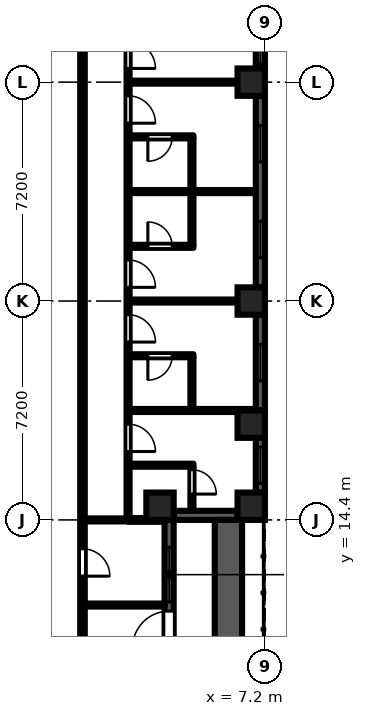
"""IFC4 building model, lengths in metres.
Left out: names, types, materials, properties, quantities, classifications, styles, units other than length and angle.
Written with IfcOpenShell. Run it as: python <this file> out.ifc"""

import sys

from ifc_helpers import new_model, si_unit, direction, frame, frame_2d, origin, origin_2d, place, context, subcontext, project, spatial, rectangle, extrude, element, fill, save


model = new_model("IFC4")
c1 = context("Model", 3, precision=1e-05, world=origin(), true_north=direction((0.0, 1.0)))
c2 = subcontext(c1, "Body", "Model", "MODEL_VIEW")
j1 = project(units=[si_unit("LENGTHUNIT", "METRE"), si_unit("PLANEANGLEUNIT", "RADIAN")], contexts=[c1])
p1 = place(None, origin())
s1 = spatial("IfcSite", under=j1, at=p1, CompositionType="ELEMENT")
p2 = place(p1, origin())
s2 = spatial("IfcBuilding", under=s1, at=p2, CompositionType="ELEMENT")
p3 = place(p2, frame((0.0, 0.0, 11.7)))
s3 = spatial("IfcBuildingStorey", under=s2, at=p3, CompositionType="ELEMENT", Elevation=11.7)
for number, where, z_axis, x_axis in (
    (1, (3.75, 14.85, 0.0), (0.0, 0.0, 1.0), (1.0, 0.0, 0.0)),
    (2, (6.75, 14.85, 0.0), (0.0, 0.0, 1.0), (1.0, 0.0, 0.0)),
    (3, (6.75, 17.55, 0.0), (0.0, 0.0, 1.0), (1.0, 0.0, 0.0)),
    (4, (6.75, 21.6, 0.0), (0.0, 0.0, 1.0), (1.0, 0.0, 0.0)),
    (5, (6.75, 28.8, 0.0), (0.0, 0.0, 1.0), (1.0, 0.0, 0.0)),
):
    element("IfcColumn", number, at=place(p3, frame(where, z_axis=z_axis, x_axis=x_axis)), inside=s3, PredefinedType="COLUMN", context=c2, shape_type="SweptSolid", body=[
        extrude(rectangle(XDim=0.9, YDim=0.9, at=origin_2d()), origin(), (0.0, 0.0, 1.0), 3.0),
    ])
p4 = place(p3, frame((4.05, 7.2, 0.0), z_axis=(0.0, 0.0, 1.0), x_axis=(0.0, 1.0, 0.0)))
e6 = element("IfcWall", 6, at=p4, inside=s3, PredefinedType="SOLIDWALL", context=c2, shape_type="SweptSolid", body=[
    extrude(rectangle(XDim=7.2, YDim=0.3, at=frame_2d((3.6, 0.0))), origin(), (0.0, 0.0, 1.0), 2.1),
])
p5 = place(p4, frame((3.0, 0.0, 0.0)))
e7 = element("IfcOpeningElement", 7, at=p5, cuts=e6, PredefinedType="OPENING", context=c2, shape_type="SweptSolid", body=[
    extrude(rectangle(XDim=1.2, YDim=2.05, at=frame_2d((0.6, 1.025))), frame((0.0, 0.16, 0.0), z_axis=(0.0, -1.0, 0.0), x_axis=(1.0, 0.0, 0.0)), (0.0, 0.0, 1.0), 0.32),
])
p6 = place(p4, frame((0.9, 0.0, 0.2)))
e8 = element("IfcOpeningElement", 8, at=p6, cuts=e6, PredefinedType="OPENING", context=c2, shape_type="SweptSolid", body=[
    extrude(rectangle(XDim=1.8, YDim=1.85, at=frame_2d((0.9, 0.925))), frame((0.0, 0.16, 0.0), z_axis=(0.0, -1.0, 0.0), x_axis=(1.0, 0.0, 0.0)), (0.0, 0.0, 1.0), 0.32),
])
p7 = place(p4, frame((4.5, 0.0, 0.2)))
e9 = element("IfcOpeningElement", 9, at=p7, cuts=e6, PredefinedType="OPENING", context=c2, shape_type="SweptSolid", body=[
    extrude(rectangle(XDim=1.8, YDim=1.85, at=frame_2d((0.9, 0.925))), frame((0.0, 0.16, 0.0), z_axis=(0.0, -1.0, 0.0), x_axis=(1.0, 0.0, 0.0)), (0.0, 0.0, 1.0), 0.32),
])
p8 = place(p3, frame((4.2, 14.55, 0.0), z_axis=(0.0, 0.0, 1.0), x_axis=(1.0, 0.0, 0.0)))
e10 = element("IfcWall", 10, at=p8, inside=s3, PredefinedType="SOLIDWALL", context=c2, shape_type="SweptSolid", body=[
    extrude(rectangle(XDim=2.1, YDim=0.3, at=frame_2d((1.05, 0.0))), origin(), (0.0, 0.0, 1.0), 2.1),
])
p9 = place(p3, frame((7.05, 15.3, 0.0), z_axis=(0.0, 0.0, 1.0), x_axis=(0.0, 1.0, 0.0)))
e11 = element("IfcWall", 11, at=p9, inside=s3, PredefinedType="SOLIDWALL", context=c2, shape_type="SweptSolid", body=[
    extrude(rectangle(XDim=1.8, YDim=0.3, at=frame_2d((0.9, 0.0))), origin(), (0.0, 0.0, 1.0), 2.1),
])
p10 = place(p9, frame((0.3, 0.0, 0.2)))
e12 = element("IfcOpeningElement", 12, at=p10, cuts=e11, PredefinedType="OPENING", context=c2, shape_type="SweptSolid", body=[
    extrude(rectangle(XDim=1.2, YDim=1.85, at=frame_2d((0.6, 0.925))), frame((0.0, 0.16, 0.0), z_axis=(0.0, -1.0, 0.0), x_axis=(1.0, 0.0, 0.0)), (0.0, 0.0, 1.0), 0.32),
])
p11 = place(p3, frame((7.05, 18.0, 0.0), z_axis=(0.0, 0.0, 1.0), x_axis=(0.0, 1.0, 0.0)))
e13 = element("IfcWall", 13, at=p11, inside=s3, PredefinedType="SOLIDWALL", context=c2, shape_type="SweptSolid", body=[
    extrude(rectangle(XDim=3.15, YDim=0.3, at=frame_2d((1.575, 0.0))), origin(), (0.0, 0.0, 1.0), 2.1),
])
p12 = place(p11, frame((0.975, 0.0, 0.2)))
e14 = element("IfcOpeningElement", 14, at=p12, cuts=e13, PredefinedType="OPENING", context=c2, shape_type="SweptSolid", body=[
    extrude(rectangle(XDim=1.2, YDim=1.85, at=frame_2d((0.6, 0.925))), frame((0.0, 0.16, 0.0), z_axis=(0.0, -1.0, 0.0), x_axis=(1.0, 0.0, 0.0)), (0.0, 0.0, 1.0), 0.32),
])
p13 = place(p3, frame((7.05, 22.05, 0.0), z_axis=(0.0, 0.0, 1.0), x_axis=(0.0, 1.0, 0.0)))
e15 = element("IfcWall", 15, at=p13, inside=s3, PredefinedType="SOLIDWALL", context=c2, shape_type="SweptSolid", body=[
    extrude(rectangle(XDim=6.3, YDim=0.3, at=frame_2d((3.15, 0.0))), origin(), (0.0, 0.0, 1.0), 2.1),
])
p14 = place(p13, frame((0.975, 0.0, 0.2)))
e16 = element("IfcOpeningElement", 16, at=p14, cuts=e15, PredefinedType="OPENING", context=c2, shape_type="SweptSolid", body=[
    extrude(rectangle(XDim=1.2, YDim=1.85, at=frame_2d((0.6, 0.925))), frame((0.0, 0.16, 0.0), z_axis=(0.0, -1.0, 0.0), x_axis=(1.0, 0.0, 0.0)), (0.0, 0.0, 1.0), 0.32),
])
p15 = place(p13, frame((4.125, 0.0, 0.2)))
e17 = element("IfcOpeningElement", 17, at=p15, cuts=e15, PredefinedType="OPENING", context=c2, shape_type="SweptSolid", body=[
    extrude(rectangle(XDim=1.2, YDim=1.85, at=frame_2d((0.6, 0.925))), frame((0.0, 0.16, 0.0), z_axis=(0.0, -1.0, 0.0), x_axis=(1.0, 0.0, 0.0)), (0.0, 0.0, 1.0), 0.32),
])
p16 = place(p3, frame((7.05, 29.25, 0.0), z_axis=(0.0, 0.0, 1.0), x_axis=(0.0, 1.0, 0.0)))
e18 = element("IfcWall", 18, at=p16, inside=s3, PredefinedType="SOLIDWALL", context=c2, shape_type="SweptSolid", body=[
    extrude(rectangle(XDim=6.3, YDim=0.3, at=frame_2d((3.15, 0.0))), origin(), (0.0, 0.0, 1.0), 2.1),
])
p17 = place(p16, frame((0.15, 0.0, 0.2)))
e19 = element("IfcOpeningElement", 19, at=p17, cuts=e18, PredefinedType="OPENING", context=c2, shape_type="SweptSolid", body=[
    extrude(rectangle(XDim=2.4, YDim=1.85, at=frame_2d((1.2, 0.925))), frame((0.0, 0.16, 0.0), z_axis=(0.0, -1.0, 0.0), x_axis=(1.0, 0.0, 0.0)), (0.0, 0.0, 1.0), 0.32),
])
p18 = place(p3, frame((6.0, 7.2, 0.0), z_axis=(0.0, 0.0, 1.0), x_axis=(0.0, 1.0, 0.0)))
e20 = element("IfcWall", 20, at=p18, inside=s3, PredefinedType="PARAPET", context=c2, shape_type="SweptSolid", body=[
    extrude(rectangle(XDim=7.2, YDim=0.9, at=frame_2d((3.6, 0.0))), origin(), (0.0, 0.0, 1.0), 0.8),
])
p19 = place(p3, frame((1.2, 1.125, 0.0), z_axis=(0.0, 0.0, 1.0), x_axis=(0.0, 1.0, 0.0)))
e21 = element("IfcWall", 21, at=p19, inside=s3, PredefinedType="PARTITIONING", context=c2, shape_type="SweptSolid", body=[
    extrude(rectangle(XDim=35.375, YDim=0.15, at=frame_2d((17.688, 0.0))), origin(), (0.0, 0.0, 1.0), 2.575),
])
p20 = place(p19, frame((2.625, 0.0, 0.0)))
e22 = element("IfcOpeningElement", 22, at=p20, cuts=e21, PredefinedType="OPENING", context=c2, shape_type="SweptSolid", body=[
    extrude(rectangle(XDim=0.9, YDim=2.1, at=frame_2d((0.45, 1.05))), frame((0.0, 0.085, 0.0), z_axis=(0.0, -1.0, 0.0), x_axis=(1.0, 0.0, 0.0)), (0.0, 0.0, 1.0), 0.17),
])
p21 = place(p19, frame((11.425, 0.0, 0.0)))
e23 = element("IfcOpeningElement", 23, at=p21, cuts=e21, PredefinedType="OPENING", context=c2, shape_type="SweptSolid", body=[
    extrude(rectangle(XDim=0.9, YDim=2.1, at=frame_2d((0.45, 1.05))), frame((0.0, 0.085, 0.0), z_axis=(0.0, -1.0, 0.0), x_axis=(1.0, 0.0, 0.0)), (0.0, 0.0, 1.0), 0.17),
])
p22 = place(p19, frame((7.825, 0.0, 0.0)))
e24 = element("IfcOpeningElement", 24, at=p22, cuts=e21, PredefinedType="OPENING", context=c2, shape_type="SweptSolid", body=[
    extrude(rectangle(XDim=0.9, YDim=2.1, at=frame_2d((0.45, 1.05))), frame((0.0, 0.085, 0.0), z_axis=(0.0, -1.0, 0.0), x_axis=(1.0, 0.0, 0.0)), (0.0, 0.0, 1.0), 0.17),
])
p23 = place(p19, frame((32.825, 0.0, 0.0)))
e25 = element("IfcOpeningElement", 25, at=p23, cuts=e21, PredefinedType="OPENING", context=c2, shape_type="SweptSolid", body=[
    extrude(rectangle(XDim=1.0, YDim=2.1, at=frame_2d((0.5, 1.05))), frame((0.0, 0.085, 0.0), z_axis=(0.0, -1.0, 0.0), x_axis=(1.0, 0.0, 0.0)), (0.0, 0.0, 1.0), 0.17),
])
p24 = place(p3, frame((1.275, 11.6, 0.0), z_axis=(0.0, 0.0, 1.0), x_axis=(1.0, 0.0, 0.0)))
e26 = element("IfcWall", 26, at=p24, inside=s3, PredefinedType="PARTITIONING", context=c2, shape_type="SweptSolid", body=[
    extrude(rectangle(XDim=2.625, YDim=0.1, at=frame_2d((1.312, 0.0))), origin(), (0.0, 0.0, 1.0), 2.575),
])
p25 = place(p3, frame((1.275, 14.4, 0.0), z_axis=(0.0, 0.0, 1.0), x_axis=(1.0, 0.0, 0.0)))
e27 = element("IfcWall", 27, at=p25, inside=s3, PredefinedType="PARTITIONING", context=c2, shape_type="SweptSolid", body=[
    extrude(rectangle(XDim=1.425, YDim=0.1, at=frame_2d((0.712, 0.0))), origin(), (0.0, 0.0, 1.0), 2.575),
])
p26 = place(p3, frame((2.7, 14.462, 0.0), z_axis=(0.0, 0.0, 1.0), x_axis=(0.0, 1.0, 0.0)))
e28 = element("IfcWall", 28, at=p26, inside=s3, PredefinedType="PARTITIONING", context=c2, shape_type="SweptSolid", body=[
    extrude(rectangle(XDim=17.888, YDim=0.1, at=frame_2d((8.944, 0.0))), origin(), (0.0, 0.0, 1.0), 2.575),
])
p27 = place(p26, frame((2.188, 0.0, 0.0)))
e29 = element("IfcOpeningElement", 29, at=p27, cuts=e28, PredefinedType="OPENING", context=c2, shape_type="SweptSolid", body=[
    extrude(rectangle(XDim=0.9, YDim=2.1, at=frame_2d((0.45, 1.05))), frame((0.0, 0.06, 0.0), z_axis=(0.0, -1.0, 0.0), x_axis=(1.0, 0.0, 0.0)), (0.0, 0.0, 1.0), 0.12),
])
p28 = place(p26, frame((5.788, 0.0, 0.0)))
e30 = element("IfcOpeningElement", 30, at=p28, cuts=e28, PredefinedType="OPENING", context=c2, shape_type="SweptSolid", body=[
    extrude(rectangle(XDim=0.9, YDim=2.1, at=frame_2d((0.45, 1.05))), frame((0.0, 0.06, 0.0), z_axis=(0.0, -1.0, 0.0), x_axis=(1.0, 0.0, 0.0)), (0.0, 0.0, 1.0), 0.12),
])
p29 = place(p26, frame((7.587, 0.0, 0.0)))
e31 = element("IfcOpeningElement", 31, at=p29, cuts=e28, PredefinedType="OPENING", context=c2, shape_type="SweptSolid", body=[
    extrude(rectangle(XDim=0.9, YDim=2.1, at=frame_2d((0.45, 1.05))), frame((0.0, 0.06, 0.0), z_axis=(0.0, -1.0, 0.0), x_axis=(1.0, 0.0, 0.0)), (0.0, 0.0, 1.0), 0.12),
])
p30 = place(p26, frame((12.988, 0.0, 0.0)))
e32 = element("IfcOpeningElement", 32, at=p30, cuts=e28, PredefinedType="OPENING", context=c2, shape_type="SweptSolid", body=[
    extrude(rectangle(XDim=0.9, YDim=2.1, at=frame_2d((0.45, 1.05))), frame((0.0, 0.06, 0.0), z_axis=(0.0, -1.0, 0.0), x_axis=(1.0, 0.0, 0.0)), (0.0, 0.0, 1.0), 0.12),
])
p31 = place(p26, frame((14.788, 0.0, 0.0)))
e33 = element("IfcOpeningElement", 33, at=p31, cuts=e28, PredefinedType="OPENING", context=c2, shape_type="SweptSolid", body=[
    extrude(rectangle(XDim=0.9, YDim=2.1, at=frame_2d((0.45, 1.05))), frame((0.0, 0.06, 0.0), z_axis=(0.0, -1.0, 0.0), x_axis=(1.0, 0.0, 0.0)), (0.0, 0.0, 1.0), 0.12),
])
p32 = place(p3, frame((2.7, 14.4, 0.0), z_axis=(0.0, 0.0, 1.0), x_axis=(1.0, 0.0, 0.0)))
e34 = element("IfcWall", 34, at=p32, inside=s3, PredefinedType="PARTITIONING", context=c2, shape_type="SweptSolid", body=[
    extrude(rectangle(XDim=1.2, YDim=0.125, at=frame_2d((0.6, 0.0))), origin(), (0.0, 0.0, 1.0), 2.575),
])
p33 = place(p3, frame((2.75, 16.2, 0.0), z_axis=(0.0, 0.0, 1.0), x_axis=(1.0, 0.0, 0.0)))
e35 = element("IfcWall", 35, at=p33, inside=s3, PredefinedType="PARTITIONING", context=c2, shape_type="SweptSolid", body=[
    extrude(rectangle(XDim=2.1, YDim=0.1, at=frame_2d((1.05, 0.0))), origin(), (0.0, 0.0, 1.0), 2.575),
])
p34 = place(p3, frame((2.75, 18.0, 0.0), z_axis=(0.0, 0.0, 1.0), x_axis=(1.0, 0.0, 0.0)))
e36 = element("IfcWall", 36, at=p34, inside=s3, PredefinedType="PARTITIONING", context=c2, shape_type="SweptSolid", body=[
    extrude(rectangle(XDim=4.15, YDim=0.1, at=frame_2d((2.075, 0.0))), origin(), (0.0, 0.0, 1.0), 2.575),
])
p35 = place(p3, frame((2.75, 19.8, 0.0), z_axis=(0.0, 0.0, 1.0), x_axis=(1.0, 0.0, 0.0)))
e37 = element("IfcWall", 37, at=p35, inside=s3, PredefinedType="PARTITIONING", context=c2, shape_type="SweptSolid", body=[
    extrude(rectangle(XDim=2.1, YDim=0.1, at=frame_2d((1.05, 0.0))), origin(), (0.0, 0.0, 1.0), 2.575),
])
p36 = place(p35, frame((0.6, 0.0, 0.0)))
e38 = element("IfcOpeningElement", 38, at=p36, cuts=e37, PredefinedType="OPENING", context=c2, shape_type="SweptSolid", body=[
    extrude(rectangle(XDim=0.8, YDim=2.1, at=frame_2d((0.4, 1.05))), frame((0.0, 0.06, 0.0), z_axis=(0.0, -1.0, 0.0), x_axis=(1.0, 0.0, 0.0)), (0.0, 0.0, 1.0), 0.12),
])
p37 = place(p3, frame((2.75, 21.6, 0.0), z_axis=(0.0, 0.0, 1.0), x_axis=(1.0, 0.0, 0.0)))
e39 = element("IfcWall", 39, at=p37, inside=s3, PredefinedType="PARTITIONING", context=c2, shape_type="SweptSolid", body=[
    extrude(rectangle(XDim=4.15, YDim=0.1, at=frame_2d((2.075, 0.0))), origin(), (0.0, 0.0, 1.0), 2.575),
])
p38 = place(p3, frame((2.75, 23.4, 0.0), z_axis=(0.0, 0.0, 1.0), x_axis=(1.0, 0.0, 0.0)))
e40 = element("IfcWall", 40, at=p38, inside=s3, PredefinedType="PARTITIONING", context=c2, shape_type="SweptSolid", body=[
    extrude(rectangle(XDim=2.1, YDim=0.1, at=frame_2d((1.05, 0.0))), origin(), (0.0, 0.0, 1.0), 2.575),
])
p39 = place(p38, frame((0.6, 0.0, 0.0)))
e41 = element("IfcOpeningElement", 41, at=p39, cuts=e40, PredefinedType="OPENING", context=c2, shape_type="SweptSolid", body=[
    extrude(rectangle(XDim=0.8, YDim=2.1, at=frame_2d((0.4, 1.05))), frame((0.0, 0.06, 0.0), z_axis=(0.0, -1.0, 0.0), x_axis=(1.0, 0.0, 0.0)), (0.0, 0.0, 1.0), 0.12),
])
p40 = place(p3, frame((2.75, 25.2, 0.0), z_axis=(0.0, 0.0, 1.0), x_axis=(1.0, 0.0, 0.0)))
e42 = element("IfcWall", 42, at=p40, inside=s3, PredefinedType="PARTITIONING", context=c2, shape_type="SweptSolid", body=[
    extrude(rectangle(XDim=4.15, YDim=0.1, at=frame_2d((2.075, 0.0))), origin(), (0.0, 0.0, 1.0), 2.575),
])
p41 = place(p3, frame((2.75, 27.0, 0.0), z_axis=(0.0, 0.0, 1.0), x_axis=(1.0, 0.0, 0.0)))
e43 = element("IfcWall", 43, at=p41, inside=s3, PredefinedType="PARTITIONING", context=c2, shape_type="SweptSolid", body=[
    extrude(rectangle(XDim=2.1, YDim=0.1, at=frame_2d((1.05, 0.0))), origin(), (0.0, 0.0, 1.0), 2.575),
])
p42 = place(p41, frame((0.6, 0.0, 0.0)))
e44 = element("IfcOpeningElement", 44, at=p42, cuts=e43, PredefinedType="OPENING", context=c2, shape_type="SweptSolid", body=[
    extrude(rectangle(XDim=0.8, YDim=2.1, at=frame_2d((0.4, 1.05))), frame((0.0, 0.06, 0.0), z_axis=(0.0, -1.0, 0.0), x_axis=(1.0, 0.0, 0.0)), (0.0, 0.0, 1.0), 0.12),
])
p43 = place(p3, frame((2.75, 28.8, 0.0), z_axis=(0.0, 0.0, 1.0), x_axis=(1.0, 0.0, 0.0)))
e45 = element("IfcWall", 45, at=p43, inside=s3, PredefinedType="PARTITIONING", context=c2, shape_type="SweptSolid", body=[
    extrude(rectangle(XDim=4.15, YDim=0.1, at=frame_2d((2.075, 0.0))), origin(), (0.0, 0.0, 1.0), 2.575),
])
p44 = place(p3, frame((4.8, 14.7, 0.0), z_axis=(0.0, 0.0, 1.0), x_axis=(0.0, 1.0, 0.0)))
e46 = element("IfcWall", 46, at=p44, inside=s3, PredefinedType="PARTITIONING", context=c2, shape_type="SweptSolid", body=[
    extrude(rectangle(XDim=1.45, YDim=0.1, at=frame_2d((0.725, 0.0))), origin(), (0.0, 0.0, 1.0), 2.575),
])
p45 = place(p44, frame((0.55, 0.0, 0.0)))
e47 = element("IfcOpeningElement", 47, at=p45, cuts=e46, PredefinedType="OPENING", context=c2, shape_type="SweptSolid", body=[
    extrude(rectangle(XDim=0.8, YDim=2.1, at=frame_2d((0.4, 1.05))), frame((0.0, 0.06, 0.0), z_axis=(0.0, -1.0, 0.0), x_axis=(1.0, 0.0, 0.0)), (0.0, 0.0, 1.0), 0.12),
])
p46 = place(p3, frame((4.8, 18.05, 0.0), z_axis=(0.0, 0.0, 1.0), x_axis=(0.0, 1.0, 0.0)))
e48 = element("IfcWall", 48, at=p46, inside=s3, PredefinedType="PARTITIONING", context=c2, shape_type="SweptSolid", body=[
    extrude(rectangle(XDim=1.7, YDim=0.1, at=frame_2d((0.85, 0.0))), origin(), (0.0, 0.0, 1.0), 2.575),
])
p47 = place(p3, frame((4.8, 23.45, 0.0), z_axis=(0.0, 0.0, 1.0), x_axis=(0.0, 1.0, 0.0)))
e49 = element("IfcWall", 49, at=p47, inside=s3, PredefinedType="PARTITIONING", context=c2, shape_type="SweptSolid", body=[
    extrude(rectangle(XDim=3.5, YDim=0.1, at=frame_2d((1.75, 0.0))), origin(), (0.0, 0.0, 1.0), 2.575),
])
p48 = place(p5, origin())
e50 = element("IfcDoor", 50, at=p48, inside=s3, OperationType="SINGLE_SWING_LEFT", PredefinedType="DOOR", context=c2, shape_type="SweptSolid", body=[
    extrude(rectangle(XDim=1.2, YDim=2.05, at=frame_2d((0.6, 1.025))), frame((0.0, 0.025, 0.0), z_axis=(0.0, -1.0, 0.0), x_axis=(1.0, 0.0, 0.0)), (0.0, 0.0, 1.0), 0.05),
])
fill(e7, e50)
p49 = place(p7, origin())
e51 = element("IfcWindow", 51, at=p49, inside=s3, PartitioningType="SINGLE_PANEL", PredefinedType="WINDOW", context=c2, shape_type="SweptSolid", body=[
    extrude(rectangle(XDim=1.8, YDim=1.85, at=frame_2d((0.9, 0.925))), frame((0.0, 0.03, 0.0), z_axis=(0.0, -1.0, 0.0), x_axis=(1.0, 0.0, 0.0)), (0.0, 0.0, 1.0), 0.06),
])
fill(e9, e51)
p50 = place(p10, origin())
e52 = element("IfcWindow", 52, at=p50, inside=s3, PartitioningType="SINGLE_PANEL", PredefinedType="WINDOW", context=c2, shape_type="SweptSolid", body=[
    extrude(rectangle(XDim=1.2, YDim=1.85, at=frame_2d((0.6, 0.925))), frame((0.0, 0.03, 0.0), z_axis=(0.0, -1.0, 0.0), x_axis=(1.0, 0.0, 0.0)), (0.0, 0.0, 1.0), 0.06),
])
fill(e12, e52)
p51 = place(p12, origin())
e53 = element("IfcWindow", 53, at=p51, inside=s3, PartitioningType="SINGLE_PANEL", PredefinedType="WINDOW", context=c2, shape_type="SweptSolid", body=[
    extrude(rectangle(XDim=1.2, YDim=1.85, at=frame_2d((0.6, 0.925))), frame((0.0, 0.03, 0.0), z_axis=(0.0, -1.0, 0.0), x_axis=(1.0, 0.0, 0.0)), (0.0, 0.0, 1.0), 0.06),
])
fill(e14, e53)
p52 = place(p14, origin())
e54 = element("IfcWindow", 54, at=p52, inside=s3, PartitioningType="SINGLE_PANEL", PredefinedType="WINDOW", context=c2, shape_type="SweptSolid", body=[
    extrude(rectangle(XDim=1.2, YDim=1.85, at=frame_2d((0.6, 0.925))), frame((0.0, 0.03, 0.0), z_axis=(0.0, -1.0, 0.0), x_axis=(1.0, 0.0, 0.0)), (0.0, 0.0, 1.0), 0.06),
])
fill(e16, e54)
p53 = place(p15, origin())
e55 = element("IfcWindow", 55, at=p53, inside=s3, PartitioningType="SINGLE_PANEL", PredefinedType="WINDOW", context=c2, shape_type="SweptSolid", body=[
    extrude(rectangle(XDim=1.2, YDim=1.85, at=frame_2d((0.6, 0.925))), frame((0.0, 0.03, 0.0), z_axis=(0.0, -1.0, 0.0), x_axis=(1.0, 0.0, 0.0)), (0.0, 0.0, 1.0), 0.06),
])
fill(e17, e55)
p54 = place(p17, origin())
e56 = element("IfcWindow", 56, at=p54, inside=s3, PartitioningType="SINGLE_PANEL", PredefinedType="WINDOW", context=c2, shape_type="SweptSolid", body=[
    extrude(rectangle(XDim=2.4, YDim=1.85, at=frame_2d((1.2, 0.925))), frame((0.0, 0.03, 0.0), z_axis=(0.0, -1.0, 0.0), x_axis=(1.0, 0.0, 0.0)), (0.0, 0.0, 1.0), 0.06),
])
fill(e19, e56)
p55 = place(p21, frame((0.9, 0.0, 0.0), z_axis=(0.0, 0.0, 1.0), x_axis=(-1.0, 0.0, 0.0)))
e57 = element("IfcDoor", 57, at=p55, inside=s3, OperationType="SINGLE_SWING_RIGHT", PredefinedType="DOOR", context=c2, shape_type="SweptSolid", body=[
    extrude(rectangle(XDim=0.9, YDim=2.1, at=frame_2d((0.45, 1.05))), frame((0.0, 0.025, 0.0), z_axis=(0.0, -1.0, 0.0), x_axis=(1.0, 0.0, 0.0)), (0.0, 0.0, 1.0), 0.05),
])
fill(e23, e57)
p56 = place(p27, frame((0.9, 0.0, 0.0), z_axis=(0.0, 0.0, 1.0), x_axis=(-1.0, 0.0, 0.0)))
e58 = element("IfcDoor", 58, at=p56, inside=s3, OperationType="SINGLE_SWING_RIGHT", PredefinedType="DOOR", context=c2, shape_type="SweptSolid", body=[
    extrude(rectangle(XDim=0.9, YDim=2.1, at=frame_2d((0.45, 1.05))), frame((0.0, 0.025, 0.0), z_axis=(0.0, -1.0, 0.0), x_axis=(1.0, 0.0, 0.0)), (0.0, 0.0, 1.0), 0.05),
])
fill(e29, e58)
p57 = place(p28, frame((0.9, 0.0, 0.0), z_axis=(0.0, 0.0, 1.0), x_axis=(-1.0, 0.0, 0.0)))
e59 = element("IfcDoor", 59, at=p57, inside=s3, OperationType="SINGLE_SWING_RIGHT", PredefinedType="DOOR", context=c2, shape_type="SweptSolid", body=[
    extrude(rectangle(XDim=0.9, YDim=2.1, at=frame_2d((0.45, 1.05))), frame((0.0, 0.025, 0.0), z_axis=(0.0, -1.0, 0.0), x_axis=(1.0, 0.0, 0.0)), (0.0, 0.0, 1.0), 0.05),
])
fill(e30, e59)
p58 = place(p29, frame((0.9, 0.0, 0.0), z_axis=(0.0, 0.0, 1.0), x_axis=(-1.0, 0.0, 0.0)))
e60 = element("IfcDoor", 60, at=p58, inside=s3, OperationType="SINGLE_SWING_RIGHT", PredefinedType="DOOR", context=c2, shape_type="SweptSolid", body=[
    extrude(rectangle(XDim=0.9, YDim=2.1, at=frame_2d((0.45, 1.05))), frame((0.0, 0.025, 0.0), z_axis=(0.0, -1.0, 0.0), x_axis=(1.0, 0.0, 0.0)), (0.0, 0.0, 1.0), 0.05),
])
fill(e31, e60)
p59 = place(p30, frame((0.9, 0.0, 0.0), z_axis=(0.0, 0.0, 1.0), x_axis=(-1.0, 0.0, 0.0)))
e61 = element("IfcDoor", 61, at=p59, inside=s3, OperationType="SINGLE_SWING_RIGHT", PredefinedType="DOOR", context=c2, shape_type="SweptSolid", body=[
    extrude(rectangle(XDim=0.9, YDim=2.1, at=frame_2d((0.45, 1.05))), frame((0.0, 0.025, 0.0), z_axis=(0.0, -1.0, 0.0), x_axis=(1.0, 0.0, 0.0)), (0.0, 0.0, 1.0), 0.05),
])
fill(e32, e61)
p60 = place(p31, frame((0.9, 0.0, 0.0), z_axis=(0.0, 0.0, 1.0), x_axis=(-1.0, 0.0, 0.0)))
e62 = element("IfcDoor", 62, at=p60, inside=s3, OperationType="SINGLE_SWING_RIGHT", PredefinedType="DOOR", context=c2, shape_type="SweptSolid", body=[
    extrude(rectangle(XDim=0.9, YDim=2.1, at=frame_2d((0.45, 1.05))), frame((0.0, 0.025, 0.0), z_axis=(0.0, -1.0, 0.0), x_axis=(1.0, 0.0, 0.0)), (0.0, 0.0, 1.0), 0.05),
])
fill(e33, e62)
p61 = place(p45, frame((0.8, 0.0, 0.0), z_axis=(0.0, 0.0, 1.0), x_axis=(-1.0, 0.0, 0.0)))
e63 = element("IfcDoor", 63, at=p61, inside=s3, OperationType="SINGLE_SWING_RIGHT", PredefinedType="DOOR", context=c2, shape_type="SweptSolid", body=[
    extrude(rectangle(XDim=0.8, YDim=2.1, at=frame_2d((0.4, 1.05))), frame((0.0, 0.025, 0.0), z_axis=(0.0, -1.0, 0.0), x_axis=(1.0, 0.0, 0.0)), (0.0, 0.0, 1.0), 0.05),
])
fill(e47, e63)
p62 = place(p36, frame((0.8, 0.0, 0.0), z_axis=(0.0, 0.0, 1.0), x_axis=(-1.0, 0.0, 0.0)))
e64 = element("IfcDoor", 64, at=p62, inside=s3, OperationType="SINGLE_SWING_RIGHT", PredefinedType="DOOR", context=c2, shape_type="SweptSolid", body=[
    extrude(rectangle(XDim=0.8, YDim=2.1, at=frame_2d((0.4, 1.05))), frame((0.0, 0.025, 0.0), z_axis=(0.0, -1.0, 0.0), x_axis=(1.0, 0.0, 0.0)), (0.0, 0.0, 1.0), 0.05),
])
fill(e38, e64)
p63 = place(p39, origin())
e65 = element("IfcDoor", 65, at=p63, inside=s3, OperationType="SINGLE_SWING_LEFT", PredefinedType="DOOR", context=c2, shape_type="SweptSolid", body=[
    extrude(rectangle(XDim=0.8, YDim=2.1, at=frame_2d((0.4, 1.05))), frame((0.0, 0.025, 0.0), z_axis=(0.0, -1.0, 0.0), x_axis=(1.0, 0.0, 0.0)), (0.0, 0.0, 1.0), 0.05),
])
fill(e41, e65)
p64 = place(p42, frame((0.8, 0.0, 0.0), z_axis=(0.0, 0.0, 1.0), x_axis=(-1.0, 0.0, 0.0)))
e66 = element("IfcDoor", 66, at=p64, inside=s3, OperationType="SINGLE_SWING_RIGHT", PredefinedType="DOOR", context=c2, shape_type="SweptSolid", body=[
    extrude(rectangle(XDim=0.8, YDim=2.1, at=frame_2d((0.4, 1.05))), frame((0.0, 0.025, 0.0), z_axis=(0.0, -1.0, 0.0), x_axis=(1.0, 0.0, 0.0)), (0.0, 0.0, 1.0), 0.05),
])
fill(e44, e66)
save(model, sys.argv[1])
